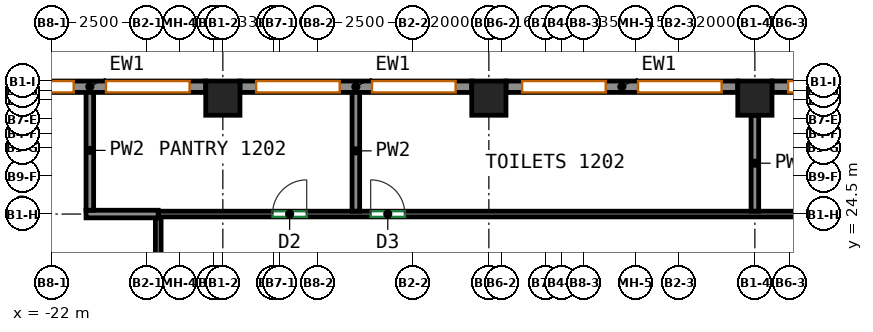
"""IFC4 building model, lengths in metres.
Left out: names, types, materials, properties, quantities, classifications, styles, units other than length and angle.
Written with IfcOpenShell. Run it as: python <this file> out.ifc"""

import sys

from ifc_helpers import new_model, si_unit, direction, frame, frame_2d, origin, origin_2d, place, context, subcontext, project, spatial, rectangle, extrude, source, transform, mapped, element, fill, save


model = new_model("IFC4")
c1 = context("Model", 3, precision=1e-05, world=origin(), true_north=direction((0.0, 1.0)))
c2 = subcontext(c1, "Body", "Model", "MODEL_VIEW")
j1 = project(units=[si_unit("LENGTHUNIT", "METRE"), si_unit("PLANEANGLEUNIT", "RADIAN")], contexts=[c1])
p1 = place(None, origin())
s1 = spatial("IfcSite", under=j1, at=p1, CompositionType="ELEMENT")
p2 = place(p1, origin())
s2 = spatial("IfcBuilding", under=s1, at=p2, CompositionType="ELEMENT")
p3 = place(p2, frame((0.0, 0.0, 55.0)))
s3 = spatial("IfcBuildingStorey", under=s2, at=p3, CompositionType="ELEMENT", Elevation=55.0)
m1 = source(origin(), c2, "Body", "SweptSolid", [
    extrude(rectangle(XDim=0.9, YDim=0.9, at=origin_2d()), origin(), (0.0, 0.0, 1.0), 3.6),
])
for number, where, z_axis, x_axis in (
    (1, (-17.5, 27.55, 0.0), (0.0, 0.0, 1.0), (1.0, 0.0, 0.0)),
    (2, (-10.5, 27.55, 0.0), (0.0, 0.0, 1.0), (1.0, 0.0, 0.0)),
    (3, (-3.5, 27.55, 0.0), (0.0, 0.0, 1.0), (1.0, 0.0, 0.0)),
):
    element("IfcColumn", number, at=place(p3, frame(where, z_axis=z_axis, x_axis=x_axis)), inside=s3, PredefinedType="COLUMN", context=c2, shape_type="MappedRepresentation", body=[
        mapped(m1, transform((0.0, 0.0, 0.0))),
    ])
m2 = source(origin(), c2, "Body", "SweptSolid", [
    extrude(rectangle(XDim=6.1, YDim=0.3, at=frame_2d((3.05, 0.0))), origin(), (0.0, 0.0, 1.0), 3.6),
])
p4 = place(p3, frame((3.05, 27.85, 0.0), z_axis=(0.0, 0.0, 1.0), x_axis=(-1.0, 0.0, 0.0)))
e4 = element("IfcWall", 4, at=p4, inside=s3, PredefinedType="SOLIDWALL", context=c2, shape_type="MappedRepresentation", body=[
    mapped(m2, transform((0.0, 0.0, 0.0))),
])
p5 = place(p4, frame((0.425, 0.0, 0.7)))
e5 = element("IfcOpeningElement", 5, at=p5, cuts=e4, PredefinedType="OPENING", context=c2, shape_type="SweptSolid", body=[
    extrude(rectangle(XDim=2.2, YDim=2.25, at=frame_2d((1.1, 1.125))), frame((0.0, 0.16, 0.0), z_axis=(0.0, -1.0, 0.0), x_axis=(1.0, 0.0, 0.0)), (0.0, 0.0, 1.0), 0.32),
])
p6 = place(p4, frame((3.475, 0.0, 0.7)))
e6 = element("IfcOpeningElement", 6, at=p6, cuts=e4, PredefinedType="OPENING", context=c2, shape_type="SweptSolid", body=[
    extrude(rectangle(XDim=2.2, YDim=2.25, at=frame_2d((1.1, 1.125))), frame((0.0, 0.16, 0.0), z_axis=(0.0, -1.0, 0.0), x_axis=(1.0, 0.0, 0.0)), (0.0, 0.0, 1.0), 0.32),
])
p7 = place(p3, frame((-3.95, 27.85, 0.0), z_axis=(0.0, 0.0, 1.0), x_axis=(-1.0, 0.0, 0.0)))
e7 = element("IfcWall", 7, at=p7, inside=s3, PredefinedType="SOLIDWALL", context=c2, shape_type="MappedRepresentation", body=[
    mapped(m2, transform((0.0, 0.0, 0.0))),
])
p8 = place(p7, frame((0.425, 0.0, 0.7)))
e8 = element("IfcOpeningElement", 8, at=p8, cuts=e7, PredefinedType="OPENING", context=c2, shape_type="SweptSolid", body=[
    extrude(rectangle(XDim=2.2, YDim=2.25, at=frame_2d((1.1, 1.125))), frame((0.0, 0.16, 0.0), z_axis=(0.0, -1.0, 0.0), x_axis=(1.0, 0.0, 0.0)), (0.0, 0.0, 1.0), 0.32),
])
p9 = place(p7, frame((3.475, 0.0, 0.7)))
e9 = element("IfcOpeningElement", 9, at=p9, cuts=e7, PredefinedType="OPENING", context=c2, shape_type="SweptSolid", body=[
    extrude(rectangle(XDim=2.2, YDim=2.25, at=frame_2d((1.1, 1.125))), frame((0.0, 0.16, 0.0), z_axis=(0.0, -1.0, 0.0), x_axis=(1.0, 0.0, 0.0)), (0.0, 0.0, 1.0), 0.32),
])
p10 = place(p3, frame((-10.95, 27.85, 0.0), z_axis=(0.0, 0.0, 1.0), x_axis=(-1.0, 0.0, 0.0)))
e10 = element("IfcWall", 10, at=p10, inside=s3, PredefinedType="SOLIDWALL", context=c2, shape_type="MappedRepresentation", body=[
    mapped(m2, transform((0.0, 0.0, 0.0))),
])
p11 = place(p10, frame((0.425, 0.0, 0.7)))
e11 = element("IfcOpeningElement", 11, at=p11, cuts=e10, PredefinedType="OPENING", context=c2, shape_type="SweptSolid", body=[
    extrude(rectangle(XDim=2.2, YDim=2.25, at=frame_2d((1.1, 1.125))), frame((0.0, 0.16, 0.0), z_axis=(0.0, -1.0, 0.0), x_axis=(1.0, 0.0, 0.0)), (0.0, 0.0, 1.0), 0.32),
])
p12 = place(p10, frame((3.475, 0.0, 0.7)))
e12 = element("IfcOpeningElement", 12, at=p12, cuts=e10, PredefinedType="OPENING", context=c2, shape_type="SweptSolid", body=[
    extrude(rectangle(XDim=2.2, YDim=2.25, at=frame_2d((1.1, 1.125))), frame((0.0, 0.16, 0.0), z_axis=(0.0, -1.0, 0.0), x_axis=(1.0, 0.0, 0.0)), (0.0, 0.0, 1.0), 0.32),
])
p13 = place(p3, frame((-17.95, 27.85, 0.0), z_axis=(0.0, 0.0, 1.0), x_axis=(-1.0, 0.0, 0.0)))
e13 = element("IfcWall", 13, at=p13, inside=s3, PredefinedType="SOLIDWALL", context=c2, shape_type="MappedRepresentation", body=[
    mapped(m2, transform((0.0, 0.0, 0.0))),
])
p14 = place(p13, frame((0.425, 0.0, 0.7)))
e14 = element("IfcOpeningElement", 14, at=p14, cuts=e13, PredefinedType="OPENING", context=c2, shape_type="SweptSolid", body=[
    extrude(rectangle(XDim=2.2, YDim=2.25, at=frame_2d((1.1, 1.125))), frame((0.0, 0.16, 0.0), z_axis=(0.0, -1.0, 0.0), x_axis=(1.0, 0.0, 0.0)), (0.0, 0.0, 1.0), 0.32),
])
p15 = place(p13, frame((3.475, 0.0, 0.7)))
e15 = element("IfcOpeningElement", 15, at=p15, cuts=e13, PredefinedType="OPENING", context=c2, shape_type="SweptSolid", body=[
    extrude(rectangle(XDim=2.2, YDim=2.25, at=frame_2d((1.1, 1.125))), frame((0.0, 0.16, 0.0), z_axis=(0.0, -1.0, 0.0), x_axis=(1.0, 0.0, 0.0)), (0.0, 0.0, 1.0), 0.32),
])
p16 = place(p3, frame((-19.2, 24.5, 0.0), z_axis=(0.0, 0.0, 1.0), x_axis=(1.0, 0.0, 0.0)))
e16 = element("IfcWall", 16, at=p16, inside=s3, PredefinedType="PARTITIONING", context=c2, shape_type="SweptSolid", body=[
    extrude(rectangle(XDim=40.275, YDim=0.15, at=frame_2d((20.137, 0.0))), origin(), (0.0, 0.0, 1.0), 2.95),
])
p17 = place(p16, frame((3.007, 0.0, 0.0)))
e17 = element("IfcOpeningElement", 17, at=p17, cuts=e16, PredefinedType="OPENING", context=c2, shape_type="SweptSolid", body=[
    extrude(rectangle(XDim=0.9, YDim=2.1, at=frame_2d((0.45, 1.05))), frame((0.0, 0.085, 0.0), z_axis=(0.0, -1.0, 0.0), x_axis=(1.0, 0.0, 0.0)), (0.0, 0.0, 1.0), 0.17),
])
p18 = place(p16, frame((5.59, 0.0, 0.0)))
e18 = element("IfcOpeningElement", 18, at=p18, cuts=e16, PredefinedType="OPENING", context=c2, shape_type="SweptSolid", body=[
    extrude(rectangle(XDim=0.9, YDim=2.1, at=frame_2d((0.45, 1.05))), frame((0.0, 0.085, 0.0), z_axis=(0.0, -1.0, 0.0), x_axis=(1.0, 0.0, 0.0)), (0.0, 0.0, 1.0), 0.17),
])
p19 = place(p16, frame((38.674, 0.0, 0.0)))
e19 = element("IfcOpeningElement", 19, at=p19, cuts=e16, PredefinedType="OPENING", context=c2, shape_type="SweptSolid", body=[
    extrude(rectangle(XDim=1.0, YDim=2.1, at=frame_2d((0.5, 1.05))), frame((0.0, 0.085, 0.0), z_axis=(0.0, -1.0, 0.0), x_axis=(1.0, 0.0, 0.0)), (0.0, 0.0, 1.0), 0.17),
])
p20 = place(p3, frame((-19.2, 8.09, 0.0), z_axis=(0.0, 0.0, 1.0), x_axis=(0.0, 1.0, 0.0)))
e20 = element("IfcWall", 20, at=p20, inside=s3, PredefinedType="PARTITIONING", context=c2, shape_type="SweptSolid", body=[
    extrude(rectangle(XDim=16.31, YDim=0.15, at=frame_2d((8.155, 0.0))), origin(), (0.0, 0.0, 1.0), 3.6),
])
p21 = place(p20, frame((9.706, 0.0, 0.0)))
e21 = element("IfcOpeningElement", 21, at=p21, cuts=e20, PredefinedType="OPENING", context=c2, shape_type="SweptSolid", body=[
    extrude(rectangle(XDim=1.0, YDim=2.1, at=frame_2d((0.5, 1.05))), frame((0.0, 0.085, 0.0), z_axis=(0.0, -1.0, 0.0), x_axis=(1.0, 0.0, 0.0)), (0.0, 0.0, 1.0), 0.17),
])
p22 = place(p3, frame((-3.5, 24.576, 0.0), z_axis=(0.0, 0.0, 1.0), x_axis=(0.0, 1.0, 0.0)))
e22 = element("IfcWall", 22, at=p22, inside=s3, PredefinedType="PARTITIONING", context=c2, shape_type="SweptSolid", body=[
    extrude(rectangle(XDim=2.524, YDim=0.2, at=frame_2d((1.262, 0.0))), origin(), (0.0, 0.0, 1.0), 3.6),
])
p23 = place(p3, frame((-14.0, 27.75, 0.0), z_axis=(0.0, 0.0, 1.0), x_axis=(0.0, -1.0, 0.0)))
e23 = element("IfcWall", 23, at=p23, inside=s3, PredefinedType="PARTITIONING", context=c2, shape_type="SweptSolid", body=[
    extrude(rectangle(XDim=3.174, YDim=0.2, at=frame_2d((1.587, 0.0))), origin(), (0.0, 0.0, 1.0), 3.6),
])
p24 = place(p3, frame((-21.1, 24.5, 0.0), z_axis=(0.0, 0.0, 1.0), x_axis=(1.0, 0.0, 0.0)))
e24 = element("IfcWall", 24, at=p24, inside=s3, PredefinedType="PARTITIONING", context=c2, shape_type="SweptSolid", body=[
    extrude(rectangle(XDim=1.899, YDim=0.2, at=frame_2d((0.95, 0.0))), origin(), (0.0, 0.0, 1.0), 2.95),
])
p25 = place(p3, frame((-21.0, 24.6, 0.0), z_axis=(0.0, 0.0, 1.0), x_axis=(0.0, 1.0, 0.0)))
e25 = element("IfcWall", 25, at=p25, inside=s3, PredefinedType="PARTITIONING", context=c2, shape_type="SweptSolid", body=[
    extrude(rectangle(XDim=3.15, YDim=0.2, at=frame_2d((1.575, 0.0))), origin(), (0.0, 0.0, 1.0), 3.6),
])
p26 = place(p6, origin())
e26 = element("IfcWindow", 26, at=p26, inside=s3, PartitioningType="SINGLE_PANEL", PredefinedType="WINDOW", context=c2, shape_type="SweptSolid", body=[
    extrude(rectangle(XDim=2.2, YDim=2.25, at=frame_2d((1.1, 1.125))), frame((0.0, 0.03, 0.0), z_axis=(0.0, -1.0, 0.0), x_axis=(1.0, 0.0, 0.0)), (0.0, 0.0, 1.0), 0.06),
])
fill(e6, e26)
p27 = place(p8, origin())
e27 = element("IfcWindow", 27, at=p27, inside=s3, PartitioningType="SINGLE_PANEL", PredefinedType="WINDOW", context=c2, shape_type="SweptSolid", body=[
    extrude(rectangle(XDim=2.2, YDim=2.25, at=frame_2d((1.1, 1.125))), frame((0.0, 0.03, 0.0), z_axis=(0.0, -1.0, 0.0), x_axis=(1.0, 0.0, 0.0)), (0.0, 0.0, 1.0), 0.06),
])
fill(e8, e27)
p28 = place(p9, origin())
e28 = element("IfcWindow", 28, at=p28, inside=s3, PartitioningType="SINGLE_PANEL", PredefinedType="WINDOW", context=c2, shape_type="SweptSolid", body=[
    extrude(rectangle(XDim=2.2, YDim=2.25, at=frame_2d((1.1, 1.125))), frame((0.0, 0.03, 0.0), z_axis=(0.0, -1.0, 0.0), x_axis=(1.0, 0.0, 0.0)), (0.0, 0.0, 1.0), 0.06),
])
fill(e9, e28)
p29 = place(p11, origin())
e29 = element("IfcWindow", 29, at=p29, inside=s3, PartitioningType="SINGLE_PANEL", PredefinedType="WINDOW", context=c2, shape_type="SweptSolid", body=[
    extrude(rectangle(XDim=2.2, YDim=2.25, at=frame_2d((1.1, 1.125))), frame((0.0, 0.03, 0.0), z_axis=(0.0, -1.0, 0.0), x_axis=(1.0, 0.0, 0.0)), (0.0, 0.0, 1.0), 0.06),
])
fill(e11, e29)
p30 = place(p12, origin())
e30 = element("IfcWindow", 30, at=p30, inside=s3, PartitioningType="SINGLE_PANEL", PredefinedType="WINDOW", context=c2, shape_type="SweptSolid", body=[
    extrude(rectangle(XDim=2.2, YDim=2.25, at=frame_2d((1.1, 1.125))), frame((0.0, 0.03, 0.0), z_axis=(0.0, -1.0, 0.0), x_axis=(1.0, 0.0, 0.0)), (0.0, 0.0, 1.0), 0.06),
])
fill(e12, e30)
p31 = place(p14, origin())
e31 = element("IfcWindow", 31, at=p31, inside=s3, PartitioningType="SINGLE_PANEL", PredefinedType="WINDOW", context=c2, shape_type="SweptSolid", body=[
    extrude(rectangle(XDim=2.2, YDim=2.25, at=frame_2d((1.1, 1.125))), frame((0.0, 0.03, 0.0), z_axis=(0.0, -1.0, 0.0), x_axis=(1.0, 0.0, 0.0)), (0.0, 0.0, 1.0), 0.06),
])
fill(e14, e31)
p32 = place(p15, origin())
e32 = element("IfcWindow", 32, at=p32, inside=s3, PartitioningType="SINGLE_PANEL", PredefinedType="WINDOW", context=c2, shape_type="SweptSolid", body=[
    extrude(rectangle(XDim=2.2, YDim=2.25, at=frame_2d((1.1, 1.125))), frame((0.0, 0.03, 0.0), z_axis=(0.0, -1.0, 0.0), x_axis=(1.0, 0.0, 0.0)), (0.0, 0.0, 1.0), 0.06),
])
fill(e15, e32)
p33 = place(p17, origin())
e33 = element("IfcDoor", 33, at=p33, inside=s3, OperationType="SINGLE_SWING_RIGHT", PredefinedType="DOOR", context=c2, shape_type="SweptSolid", body=[
    extrude(rectangle(XDim=0.9, YDim=2.1, at=frame_2d((0.45, 1.05))), frame((0.0, 0.025, 0.0), z_axis=(0.0, -1.0, 0.0), x_axis=(1.0, 0.0, 0.0)), (0.0, 0.0, 1.0), 0.05),
])
fill(e17, e33)
p34 = place(p18, origin())
e34 = element("IfcDoor", 34, at=p34, inside=s3, OperationType="SINGLE_SWING_LEFT", PredefinedType="DOOR", context=c2, shape_type="SweptSolid", body=[
    extrude(rectangle(XDim=0.9, YDim=2.1, at=frame_2d((0.45, 1.05))), frame((0.0, 0.025, 0.0), z_axis=(0.0, -1.0, 0.0), x_axis=(1.0, 0.0, 0.0)), (0.0, 0.0, 1.0), 0.05),
])
fill(e18, e34)
save(model, sys.argv[1])
